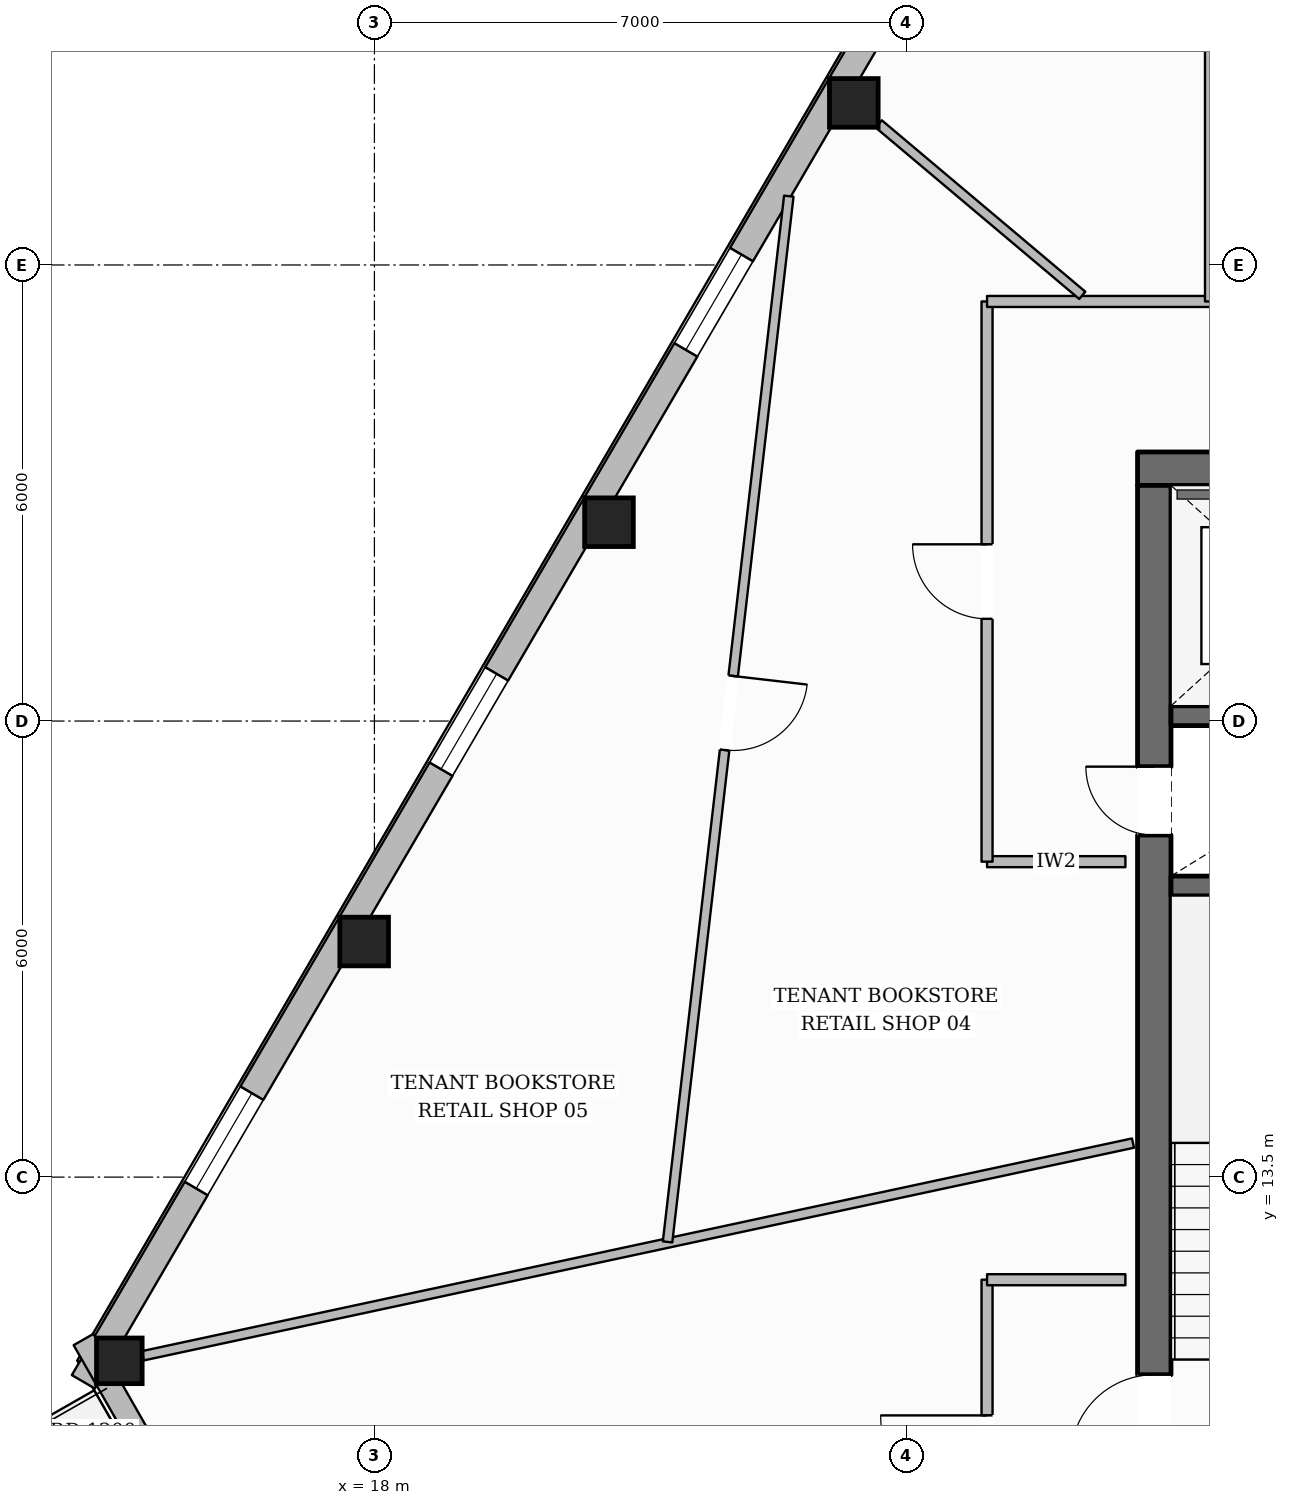
"""IFC4 building model, lengths in metres.
Left out: names, types, materials, properties, quantities, classifications, styles, units other than length and angle.
Written with IfcOpenShell. Run it as: python <this file> out.ifc"""

import sys

from ifc_helpers import new_model, si_unit, direction, frame, frame_2d, origin, origin_2d, place, context, subcontext, project, spatial, rectangle, hollow_rectangle, extrude, element, fill, save


model = new_model("IFC4")
c1 = context("Model", 3, precision=1e-05, world=origin(), true_north=direction((0.0, 1.0)))
c2 = subcontext(c1, "Body", "Model", "MODEL_VIEW")
j1 = project(units=[si_unit("LENGTHUNIT", "METRE"), si_unit("PLANEANGLEUNIT", "RADIAN")], contexts=[c1])
p1 = place(None, origin())
s1 = spatial("IfcSite", under=j1, at=p1, CompositionType="ELEMENT")
p2 = place(p1, origin())
s2 = spatial("IfcBuilding", under=s1, at=p2, CompositionType="ELEMENT")
p3 = place(p2, frame((0.0, 0.0, 218.9)))
s3 = spatial("IfcBuildingStorey", under=s2, at=p3, CompositionType="ELEMENT", Elevation=218.9)
p4 = place(p3, frame((28.04, 22.82, 0.0), z_axis=(0.0, 0.0, 1.0), x_axis=(1.0, 0.0, 0.0)))
e1 = element("IfcWall", 1, at=p4, inside=s3, PredefinedType="SOLIDWALL", context=c2, shape_type="SweptSolid", body=[
    extrude(rectangle(XDim=19.92, YDim=0.44, at=frame_2d((9.96, 0.0))), origin(), (0.0, 0.0, 1.0), 3.6),
])
p5 = place(p4, frame((6.235, 0.0, 0.0)))
e2 = element("IfcOpeningElement", 2, at=p5, cuts=e1, PredefinedType="OPENING", context=c2, shape_type="SweptSolid", body=[
    extrude(rectangle(XDim=1.05, YDim=2.15, at=frame_2d((0.525, 1.075))), frame((0.0, 0.23, 0.0), z_axis=(0.0, -1.0, 0.0), x_axis=(1.0, 0.0, 0.0)), (0.0, 0.0, 1.0), 0.46),
])
p6 = place(p4, frame((12.635, 0.0, 0.0)))
e3 = element("IfcOpeningElement", 3, at=p6, cuts=e1, PredefinedType="OPENING", context=c2, shape_type="SweptSolid", body=[
    extrude(rectangle(XDim=1.05, YDim=2.15, at=frame_2d((0.525, 1.075))), frame((0.0, 0.23, 0.0), z_axis=(0.0, -1.0, 0.0), x_axis=(1.0, 0.0, 0.0)), (0.0, 0.0, 1.0), 0.46),
])
p7 = place(p3, frame((28.26, 9.6, 0.0), z_axis=(0.0, 0.0, 1.0), x_axis=(0.0, 1.0, 0.0)))
e4 = element("IfcWall", 4, at=p7, inside=s3, PredefinedType="SOLIDWALL", context=c2, shape_type="SweptSolid", body=[
    extrude(rectangle(XDim=13.0, YDim=0.44, at=frame_2d((6.5, 0.0))), origin(), (0.0, 0.0, 1.0), 3.6),
])
p8 = place(p7, frame((0.2, 0.0, 0.0)))
e5 = element("IfcOpeningElement", 5, at=p8, cuts=e4, PredefinedType="OPENING", context=c2, shape_type="SweptSolid", body=[
    extrude(rectangle(XDim=1.1, YDim=2.15, at=frame_2d((0.55, 1.075))), frame((0.0, 0.23, 0.0), z_axis=(0.0, -1.0, 0.0), x_axis=(1.0, 0.0, 0.0)), (0.0, 0.0, 1.0), 0.46),
])
p9 = place(p7, frame((8.4, 0.0, 0.0)))
e6 = element("IfcOpeningElement", 6, at=p9, cuts=e4, PredefinedType="OPENING", context=c2, shape_type="SweptSolid", body=[
    extrude(rectangle(XDim=0.9, YDim=2.1, at=frame_2d((0.45, 1.05))), frame((0.0, 0.23, 0.0), z_axis=(0.0, -1.0, 0.0), x_axis=(1.0, 0.0, 0.0)), (0.0, 0.0, 1.0), 0.46),
])
for number, where, z_axis, x_axis in (
    (7, (28.48, 17.33, 0.0), (0.0, 0.0, 1.0), (1.0, 0.0, 0.0)),
    (8, (28.48, 19.57, 0.0), (0.0, 0.0, 1.0), (1.0, 0.0, 0.0)),
):
    element("IfcWall", number, at=place(p3, frame(where, z_axis=z_axis, x_axis=x_axis)), inside=s3, PredefinedType="SHEAR", context=c2, shape_type="SweptSolid", body=[
        extrude(rectangle(XDim=3.2, YDim=0.26, at=frame_2d((1.6, 0.0))), origin(), (0.0, 0.0, 1.0), 3.6),
    ])
for number, where, z_axis, x_axis in (
    (9, (24.307, 27.632, 0.0), (0.0, 0.0, 1.0), (1.0, 0.0, 0.0)),
    (10, (21.086, 22.116, 0.0), (0.0, 0.0, 1.0), (1.0, 0.0, 0.0)),
    (11, (17.865, 16.599, 0.0), (0.0, 0.0, 1.0), (1.0, 0.0, 0.0)),
):
    element("IfcColumn", number, at=place(p3, frame(where, z_axis=z_axis, x_axis=x_axis)), inside=s3, PredefinedType="COLUMN", context=c2, shape_type="SweptSolid", body=[
        extrude(hollow_rectangle(XDim=0.64, YDim=0.64, WallThickness=0.028, at=origin_2d()), origin(), (0.0, 0.0, 1.0), 3.6),
    ])
p10 = place(p3, frame((14.644, 11.083, 0.0), z_axis=(0.0, 0.0, 1.0), x_axis=(1.0, 0.0, 0.0)))
e12 = element("IfcColumn", 12, at=p10, inside=s3, PredefinedType="COLUMN", context=c2, shape_type="SweptSolid", body=[
    extrude(hollow_rectangle(XDim=0.6, YDim=0.6, WallThickness=0.028, at=origin_2d()), origin(), (0.0, 0.0, 1.0), 3.6),
])
p11 = place(p3, frame((14.171, 10.807, 0.0), z_axis=(0.0, 0.0, 1.0), x_axis=(0.504226548845, 0.86357141421, 0.0)))
e13 = element("IfcWall", 13, at=p11, inside=s3, PredefinedType="STANDARD", context=c2, shape_type="SweptSolid", body=[
    extrude(rectangle(XDim=39.276, YDim=0.35, at=frame_2d((19.638, 0.0))), origin(), (0.0, 0.0, 1.0), 3.132),
])
p12 = place(p11, frame((34.885, 0.0, 0.65)))
e14 = element("IfcOpeningElement", 14, at=p12, cuts=e13, PredefinedType="OPENING", context=c2, shape_type="SweptSolid", body=[
    extrude(rectangle(XDim=1.45, YDim=1.75, at=frame_2d((0.725, 0.875))), frame((0.0, 0.185, 0.0), z_axis=(0.0, -1.0, 0.0), x_axis=(1.0, 0.0, 0.0)), (0.0, 0.0, 1.0), 0.37),
])
p13 = place(p11, frame((28.497, 0.0, 0.65)))
e15 = element("IfcOpeningElement", 15, at=p13, cuts=e13, PredefinedType="OPENING", context=c2, shape_type="SweptSolid", body=[
    extrude(rectangle(XDim=1.45, YDim=1.75, at=frame_2d((0.725, 0.875))), frame((0.0, 0.185, 0.0), z_axis=(0.0, -1.0, 0.0), x_axis=(1.0, 0.0, 0.0)), (0.0, 0.0, 1.0), 0.37),
])
p14 = place(p11, frame((15.722, 0.0, 0.65)))
e16 = element("IfcOpeningElement", 16, at=p14, cuts=e13, PredefinedType="OPENING", context=c2, shape_type="SweptSolid", body=[
    extrude(rectangle(XDim=1.45, YDim=1.75, at=frame_2d((0.725, 0.875))), frame((0.0, 0.185, 0.0), z_axis=(0.0, -1.0, 0.0), x_axis=(1.0, 0.0, 0.0)), (0.0, 0.0, 1.0), 0.37),
])
p15 = place(p11, frame((9.334, 0.0, 0.65)))
e17 = element("IfcOpeningElement", 17, at=p15, cuts=e13, PredefinedType="OPENING", context=c2, shape_type="SweptSolid", body=[
    extrude(rectangle(XDim=1.45, YDim=1.75, at=frame_2d((0.725, 0.875))), frame((0.0, 0.185, 0.0), z_axis=(0.0, -1.0, 0.0), x_axis=(1.0, 0.0, 0.0)), (0.0, 0.0, 1.0), 0.37),
])
p16 = place(p11, frame((2.946, 0.0, 0.65)))
e18 = element("IfcOpeningElement", 18, at=p16, cuts=e13, PredefinedType="OPENING", context=c2, shape_type="SweptSolid", body=[
    extrude(rectangle(XDim=1.45, YDim=1.75, at=frame_2d((0.725, 0.875))), frame((0.0, 0.185, 0.0), z_axis=(0.0, -1.0, 0.0), x_axis=(1.0, 0.0, 0.0)), (0.0, 0.0, 1.0), 0.37),
])
p17 = place(p3, frame((18.534, 3.723, 0.0), z_axis=(0.0, 0.0, 1.0), x_axis=(-0.495678638022, 0.86850600908, 0.0)))
e19 = element("IfcWall", 19, at=p17, inside=s3, PredefinedType="STANDARD", context=c2, shape_type="SweptSolid", body=[
    extrude(rectangle(XDim=8.798, YDim=0.3, at=frame_2d((4.399, 0.0))), origin(), (0.0, 0.0, 1.0), 3.132),
])
p18 = place(p17, frame((3.824, 0.0, 0.0)))
e20 = element("IfcOpeningElement", 20, at=p18, cuts=e19, PredefinedType="OPENING", context=c2, shape_type="SweptSolid", body=[
    extrude(rectangle(XDim=1.15, YDim=2.2, at=frame_2d((0.575, 1.1))), frame((0.0, 0.16, 0.0), z_axis=(0.0, -1.0, 0.0), x_axis=(1.0, 0.0, 0.0)), (0.0, 0.0, 1.0), 0.32),
])
p19 = place(p3, frame((27.88, 17.65, 0.0), z_axis=(0.0, 0.0, 1.0), x_axis=(-1.0, 0.0, 0.0)))
e21 = element("IfcWall", 21, at=p19, inside=s3, PredefinedType="PARTITIONING", context=c2, shape_type="SweptSolid", body=[
    extrude(rectangle(XDim=1.82, YDim=0.145, at=frame_2d((0.91, 0.0))), origin(), (0.0, 0.0, 1.0), 3.6),
])
p20 = place(p3, frame((26.06, 17.65, 0.0), z_axis=(0.0, 0.0, 1.0), x_axis=(0.0, 1.0, 0.0)))
e22 = element("IfcWall", 22, at=p20, inside=s3, PredefinedType="PARTITIONING", context=c2, shape_type="SweptSolid", body=[
    extrude(rectangle(XDim=7.37, YDim=0.145, at=frame_2d((3.685, 0.0))), origin(), (0.0, 0.0, 1.0), 3.339),
])
p21 = place(p20, frame((3.195, 0.0, 0.0)))
e23 = element("IfcOpeningElement", 23, at=p21, cuts=e22, PredefinedType="OPENING", context=c2, shape_type="SweptSolid", body=[
    extrude(rectangle(XDim=0.98, YDim=2.15, at=frame_2d((0.49, 1.075))), frame((0.0, 0.083, 0.0), z_axis=(0.0, -1.0, 0.0), x_axis=(1.0, 0.0, 0.0)), (0.0, 0.0, 1.0), 0.165),
])
p22 = place(p3, frame((26.06, 25.02, 0.0), z_axis=(0.0, 0.0, 1.0), x_axis=(1.0, 0.0, 0.0)))
e24 = element("IfcWall", 24, at=p22, inside=s3, PredefinedType="PARTITIONING", context=c2, shape_type="SweptSolid", body=[
    extrude(rectangle(XDim=2.94, YDim=0.145, at=frame_2d((1.47, 0.0))), origin(), (0.0, 0.0, 1.0), 3.6),
])
p23 = place(p3, frame((29.0, 25.02, 0.0), z_axis=(0.0, 0.0, 1.0), x_axis=(0.0, 1.0, 0.0)))
e25 = element("IfcWall", 25, at=p23, inside=s3, PredefinedType="PARTITIONING", context=c2, shape_type="SweptSolid", body=[
    extrude(rectangle(XDim=8.542, YDim=0.145, at=frame_2d((4.271, 0.0))), origin(), (0.0, 0.0, 1.0), 3.6),
])
p24 = place(p3, frame((26.06, 7.18, 0.0), z_axis=(0.0, 0.0, 1.0), x_axis=(0.0, 1.0, 0.0)))
e26 = element("IfcWall", 26, at=p24, inside=s3, PredefinedType="PARTITIONING", context=c2, shape_type="SweptSolid", body=[
    extrude(rectangle(XDim=4.97, YDim=0.145, at=frame_2d((2.485, 0.0))), origin(), (0.0, 0.0, 1.0), 3.6),
])
p25 = place(p24, frame((1.785, 0.0, 0.0)))
e27 = element("IfcOpeningElement", 27, at=p25, cuts=e26, PredefinedType="OPENING", context=c2, shape_type="SweptSolid", body=[
    extrude(rectangle(XDim=1.4, YDim=2.2, at=frame_2d((0.7, 1.1))), frame((0.0, 0.083, 0.0), z_axis=(0.0, -1.0, 0.0), x_axis=(1.0, 0.0, 0.0)), (0.0, 0.0, 1.0), 0.165),
])
p26 = place(p3, frame((26.06, 12.15, 0.0), z_axis=(0.0, 0.0, 1.0), x_axis=(1.0, 0.0, 0.0)))
e28 = element("IfcWall", 28, at=p26, inside=s3, PredefinedType="PARTITIONING", context=c2, shape_type="SweptSolid", body=[
    extrude(rectangle(XDim=1.82, YDim=0.145, at=frame_2d((0.91, 0.0))), origin(), (0.0, 0.0, 1.0), 3.6),
])
p27 = place(p3, frame((27.313, 25.101, 0.0), z_axis=(0.0, 0.0, 1.0), x_axis=(-0.764913006453, 0.644133598378, 0.0)))
e29 = element("IfcWall", 29, at=p27, inside=s3, PredefinedType="PARTITIONING", context=c2, shape_type="SweptSolid", body=[
    extrude(rectangle(XDim=3.501, YDim=0.125, at=frame_2d((1.75, 0.0))), origin(), (0.0, 0.0, 1.0), 3.141),
])
p28 = place(p3, frame((27.98, 13.948, 0.0), z_axis=(0.0, 0.0, 1.0), x_axis=(-0.977699064588, -0.210010807112, 0.0)))
e30 = element("IfcWall", 30, at=p28, inside=s3, PredefinedType="PARTITIONING", context=c2, shape_type="SweptSolid", body=[
    extrude(rectangle(XDim=13.325, YDim=0.125, at=frame_2d((6.662, 0.0))), origin(), (0.0, 0.0, 1.0), 3.141),
])
p29 = place(p3, frame((23.452, 26.405, 0.0), z_axis=(0.0, 0.0, 1.0), x_axis=(-0.11516270541, -0.993346642055, 0.0)))
e31 = element("IfcWall", 31, at=p29, inside=s3, PredefinedType="PARTITIONING", context=c2, shape_type="SweptSolid", body=[
    extrude(rectangle(XDim=13.85, YDim=0.125, at=frame_2d((6.925, 0.0))), origin(), (0.0, 0.0, 1.0), 3.135),
])
p30 = place(p29, frame((6.355, 0.0, 0.0)))
e32 = element("IfcOpeningElement", 32, at=p30, cuts=e31, PredefinedType="OPENING", context=c2, shape_type="SweptSolid", body=[
    extrude(rectangle(XDim=0.98, YDim=2.15, at=frame_2d((0.49, 1.075))), frame((0.0, 0.073, 0.0), z_axis=(0.0, -1.0, 0.0), x_axis=(1.0, 0.0, 0.0)), (0.0, 0.0, 1.0), 0.145),
])
p31 = place(p14, origin())
e33 = element("IfcWindow", 33, at=p31, inside=s3, PartitioningType="SINGLE_PANEL", PredefinedType="WINDOW", context=c2, shape_type="SweptSolid", body=[
    extrude(rectangle(XDim=1.45, YDim=1.75, at=frame_2d((0.725, 0.875))), frame((0.0, 0.03, 0.0), z_axis=(0.0, -1.0, 0.0), x_axis=(1.0, 0.0, 0.0)), (0.0, 0.0, 1.0), 0.06),
])
fill(e16, e33)
p32 = place(p15, origin())
e34 = element("IfcWindow", 34, at=p32, inside=s3, PartitioningType="SINGLE_PANEL", PredefinedType="WINDOW", context=c2, shape_type="SweptSolid", body=[
    extrude(rectangle(XDim=1.45, YDim=1.75, at=frame_2d((0.725, 0.875))), frame((0.0, 0.03, 0.0), z_axis=(0.0, -1.0, 0.0), x_axis=(1.0, 0.0, 0.0)), (0.0, 0.0, 1.0), 0.06),
])
fill(e17, e34)
p33 = place(p16, origin())
e35 = element("IfcWindow", 35, at=p33, inside=s3, PartitioningType="SINGLE_PANEL", PredefinedType="WINDOW", context=c2, shape_type="SweptSolid", body=[
    extrude(rectangle(XDim=1.45, YDim=1.75, at=frame_2d((0.725, 0.875))), frame((0.0, 0.03, 0.0), z_axis=(0.0, -1.0, 0.0), x_axis=(1.0, 0.0, 0.0)), (0.0, 0.0, 1.0), 0.06),
])
fill(e18, e35)
p34 = place(p8, origin())
e36 = element("IfcDoor", 36, at=p34, inside=s3, OperationType="SINGLE_SWING_LEFT", PredefinedType="DOOR", context=c2, shape_type="SweptSolid", body=[
    extrude(rectangle(XDim=1.1, YDim=2.15, at=frame_2d((0.55, 1.075))), frame((0.0, 0.025, 0.0), z_axis=(0.0, -1.0, 0.0), x_axis=(1.0, 0.0, 0.0)), (0.0, 0.0, 1.0), 0.05),
])
fill(e5, e36)
p35 = place(p9, origin())
e37 = element("IfcDoor", 37, at=p35, inside=s3, OperationType="SINGLE_SWING_RIGHT", PredefinedType="DOOR", context=c2, shape_type="SweptSolid", body=[
    extrude(rectangle(XDim=0.9, YDim=2.1, at=frame_2d((0.45, 1.05))), frame((0.0, 0.025, 0.0), z_axis=(0.0, -1.0, 0.0), x_axis=(1.0, 0.0, 0.0)), (0.0, 0.0, 1.0), 0.05),
])
fill(e6, e37)
p36 = place(p21, origin())
e38 = element("IfcDoor", 38, at=p36, inside=s3, OperationType="SINGLE_SWING_RIGHT", PredefinedType="DOOR", context=c2, shape_type="SweptSolid", body=[
    extrude(rectangle(XDim=0.98, YDim=2.15, at=frame_2d((0.49, 1.075))), frame((0.0, 0.025, 0.0), z_axis=(0.0, -1.0, 0.0), x_axis=(1.0, 0.0, 0.0)), (0.0, 0.0, 1.0), 0.05),
])
fill(e23, e38)
p37 = place(p30, origin())
e39 = element("IfcDoor", 39, at=p37, inside=s3, OperationType="SINGLE_SWING_LEFT", PredefinedType="DOOR", context=c2, shape_type="SweptSolid", body=[
    extrude(rectangle(XDim=0.98, YDim=2.15, at=frame_2d((0.49, 1.075))), frame((0.0, 0.025, 0.0), z_axis=(0.0, -1.0, 0.0), x_axis=(1.0, 0.0, 0.0)), (0.0, 0.0, 1.0), 0.05),
])
fill(e32, e39)
p38 = place(p25, origin())
e40 = element("IfcDoor", 40, at=p38, inside=s3, OperationType="SINGLE_SWING_RIGHT", PredefinedType="DOOR", context=c2, shape_type="SweptSolid", body=[
    extrude(rectangle(XDim=1.4, YDim=2.2, at=frame_2d((0.7, 1.1))), frame((0.0, 0.025, 0.0), z_axis=(0.0, -1.0, 0.0), x_axis=(1.0, 0.0, 0.0)), (0.0, 0.0, 1.0), 0.05),
])
fill(e27, e40)
save(model, sys.argv[1])
